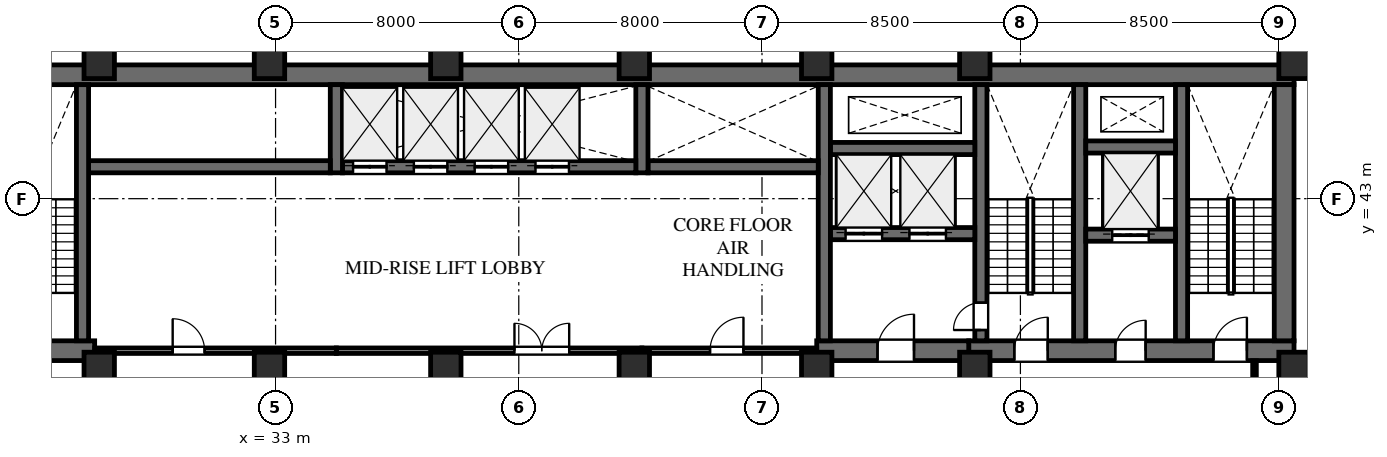
"""IFC4 building model, lengths in metres.
Left out: names, types, materials, properties, quantities, classifications, styles, units other than length and angle.
Written with IfcOpenShell. Run it as: python <this file> out.ifc"""

import sys

from ifc_helpers import new_model, si_unit, direction, frame, frame_2d, origin, origin_2d, place, context, subcontext, project, spatial, rectangle, extrude, element, fill, save


model = new_model("IFC4")
c1 = context("Model", 3, precision=1e-05, world=origin(), true_north=direction((0.0, 1.0)))
c2 = subcontext(c1, "Body", "Model", "MODEL_VIEW")
j1 = project(units=[si_unit("LENGTHUNIT", "METRE"), si_unit("PLANEANGLEUNIT", "RADIAN")], contexts=[c1])
p1 = place(None, origin())
s1 = spatial("IfcSite", under=j1, at=p1, CompositionType="ELEMENT")
p2 = place(p1, origin())
s2 = spatial("IfcBuilding", under=s1, at=p2, CompositionType="ELEMENT")
p3 = place(p2, frame((0.0, 0.0, 96.0)))
s3 = spatial("IfcBuildingStorey", under=s2, at=p3, CompositionType="ELEMENT", Elevation=96.0)
p4 = place(p3, frame((22.9, 47.075, 0.0), z_axis=(0.0, 0.0, 1.0), x_axis=(1.0, 0.0, 0.0)))
e1 = element("IfcWall", 1, at=p4, inside=s3, PredefinedType="SHEAR", context=c2, shape_type="SweptSolid", body=[
    extrude(rectangle(XDim=43.6, YDim=0.65, at=frame_2d((21.8, 0.0))), origin(), (0.0, 0.0, 1.0), 4.0),
])
p5 = place(p3, frame((55.8, 38.0, 0.0), z_axis=(0.0, 0.0, 1.0), x_axis=(1.0, 0.0, 0.0)))
e2 = element("IfcWall", 2, at=p5, inside=s3, PredefinedType="SHEAR", context=c2, shape_type="SweptSolid", body=[
    extrude(rectangle(XDim=10.7, YDim=0.65, at=frame_2d((5.35, 0.0))), origin(), (0.0, 0.0, 1.0), 4.0),
])
p6 = place(p5, frame((1.5, 0.0, 0.0)))
e3 = element("IfcOpeningElement", 3, at=p6, cuts=e2, PredefinedType="OPENING", context=c2, shape_type="SweptSolid", body=[
    extrude(rectangle(XDim=1.1, YDim=2.2, at=frame_2d((0.55, 1.1))), frame((0.0, 0.335, 0.0), z_axis=(0.0, -1.0, 0.0), x_axis=(1.0, 0.0, 0.0)), (0.0, 0.0, 1.0), 0.67),
])
p7 = place(p5, frame((4.82, 0.0, 0.0)))
e4 = element("IfcOpeningElement", 4, at=p7, cuts=e2, PredefinedType="OPENING", context=c2, shape_type="SweptSolid", body=[
    extrude(rectangle(XDim=1.0, YDim=2.15, at=frame_2d((0.5, 1.075))), frame((0.0, 0.335, 0.0), z_axis=(0.0, -1.0, 0.0), x_axis=(1.0, 0.0, 0.0)), (0.0, 0.0, 1.0), 0.67),
])
p8 = place(p5, frame((8.05, 0.0, 0.0)))
e5 = element("IfcOpeningElement", 5, at=p8, cuts=e2, PredefinedType="OPENING", context=c2, shape_type="SweptSolid", body=[
    extrude(rectangle(XDim=1.1, YDim=2.2, at=frame_2d((0.55, 1.1))), frame((0.0, 0.335, 0.0), z_axis=(0.0, -1.0, 0.0), x_axis=(1.0, 0.0, 0.0)), (0.0, 0.0, 1.0), 0.67),
])
p9 = place(p3, frame((66.175, 38.325, 0.0), z_axis=(0.0, 0.0, 1.0), x_axis=(0.0, 1.0, 0.0)))
e6 = element("IfcWall", 6, at=p9, inside=s3, PredefinedType="SHEAR", context=c2, shape_type="SweptSolid", body=[
    extrude(rectangle(XDim=8.425, YDim=0.65, at=frame_2d((4.212, 0.0))), origin(), (0.0, 0.0, 1.0), 4.0),
])
for number, where, z_axis, x_axis in (
    (7, (62.8, 38.325, 0.0), (0.0, 0.0, 1.0), (0.0, 1.0, 0.0)),
    (8, (59.45, 38.325, 0.0), (0.0, 0.0, 1.0), (0.0, 1.0, 0.0)),
):
    element("IfcWall", number, at=place(p3, frame(where, z_axis=z_axis, x_axis=x_axis)), inside=s3, PredefinedType="SHEAR", context=c2, shape_type="SweptSolid", body=[
        extrude(rectangle(XDim=8.425, YDim=0.4, at=frame_2d((4.212, 0.0))), origin(), (0.0, 0.0, 1.0), 4.0),
    ])
p10 = place(p3, frame((56.2, 38.325, 0.0), z_axis=(0.0, 0.0, 1.0), x_axis=(0.0, 1.0, 0.0)))
e9 = element("IfcWall", 9, at=p10, inside=s3, PredefinedType="SHEAR", context=c2, shape_type="SweptSolid", body=[
    extrude(rectangle(XDim=8.425, YDim=0.4, at=frame_2d((4.212, 0.0))), origin(), (0.0, 0.0, 1.0), 4.0),
])
p11 = place(p10, frame((0.355, 0.0, 0.0)))
e10 = element("IfcOpeningElement", 10, at=p11, cuts=e9, PredefinedType="OPENING", context=c2, shape_type="SweptSolid", body=[
    extrude(rectangle(XDim=0.9, YDim=2.15, at=frame_2d((0.45, 1.075))), frame((0.0, 0.21, 0.0), z_axis=(0.0, -1.0, 0.0), x_axis=(1.0, 0.0, 0.0)), (0.0, 0.0, 1.0), 0.42),
])
p12 = place(p3, frame((59.65, 41.8, 0.0), z_axis=(0.0, 0.0, 1.0), x_axis=(1.0, 0.0, 0.0)))
e11 = element("IfcWall", 11, at=p12, inside=s3, PredefinedType="SHEAR", context=c2, shape_type="SweptSolid", body=[
    extrude(rectangle(XDim=2.95, YDim=0.4, at=frame_2d((1.475, 0.0))), origin(), (0.0, 0.0, 1.0), 4.0),
])
p13 = place(p12, frame((0.87, 0.0, 0.0)))
e12 = element("IfcOpeningElement", 12, at=p13, cuts=e11, PredefinedType="OPENING", context=c2, shape_type="SweptSolid", body=[
    extrude(rectangle(XDim=1.2, YDim=2.2, at=frame_2d((0.6, 1.1))), frame((0.0, 0.21, 0.0), z_axis=(0.0, -1.0, 0.0), x_axis=(1.0, 0.0, 0.0)), (0.0, 0.0, 1.0), 0.42),
])
p14 = place(p3, frame((59.65, 44.7, 0.0), z_axis=(0.0, 0.0, 1.0), x_axis=(1.0, 0.0, 0.0)))
e13 = element("IfcWall", 13, at=p14, inside=s3, PredefinedType="SHEAR", context=c2, shape_type="SweptSolid", body=[
    extrude(rectangle(XDim=2.95, YDim=0.4, at=frame_2d((1.475, 0.0))), origin(), (0.0, 0.0, 1.0), 4.0),
])
p15 = place(p3, frame((50.8, 38.0, 0.0), z_axis=(0.0, 0.0, 1.0), x_axis=(1.0, 0.0, 0.0)))
e14 = element("IfcWall", 14, at=p15, inside=s3, PredefinedType="SHEAR", context=c2, shape_type="SweptSolid", body=[
    extrude(rectangle(XDim=5.0, YDim=0.65, at=frame_2d((2.5, 0.0))), origin(), (0.0, 0.0, 1.0), 4.0),
])
p16 = place(p15, frame((2.0, 0.0, 0.0)))
e15 = element("IfcOpeningElement", 15, at=p16, cuts=e14, PredefinedType="OPENING", context=c2, shape_type="SweptSolid", body=[
    extrude(rectangle(XDim=1.2, YDim=2.2, at=frame_2d((0.6, 1.1))), frame((0.0, 0.335, 0.0), z_axis=(0.0, -1.0, 0.0), x_axis=(1.0, 0.0, 0.0)), (0.0, 0.0, 1.0), 0.67),
])
p17 = place(p3, frame((51.25, 41.85, 0.0), z_axis=(0.0, 0.0, 1.0), x_axis=(1.0, 0.0, 0.0)))
e16 = element("IfcWall", 16, at=p17, inside=s3, PredefinedType="SHEAR", context=c2, shape_type="SweptSolid", body=[
    extrude(rectangle(XDim=4.75, YDim=0.4, at=frame_2d((2.375, 0.0))), origin(), (0.0, 0.0, 1.0), 4.0),
])
p18 = place(p17, frame((0.5, 0.0, 0.0)))
e17 = element("IfcOpeningElement", 17, at=p18, cuts=e16, PredefinedType="OPENING", context=c2, shape_type="SweptSolid", body=[
    extrude(rectangle(XDim=1.2, YDim=2.2, at=frame_2d((0.6, 1.1))), frame((0.0, 0.21, 0.0), z_axis=(0.0, -1.0, 0.0), x_axis=(1.0, 0.0, 0.0)), (0.0, 0.0, 1.0), 0.42),
])
p19 = place(p17, frame((2.6, 0.0, 0.0)))
e18 = element("IfcOpeningElement", 18, at=p19, cuts=e16, PredefinedType="OPENING", context=c2, shape_type="SweptSolid", body=[
    extrude(rectangle(XDim=1.2, YDim=2.2, at=frame_2d((0.6, 1.1))), frame((0.0, 0.21, 0.0), z_axis=(0.0, -1.0, 0.0), x_axis=(1.0, 0.0, 0.0)), (0.0, 0.0, 1.0), 0.42),
])
p20 = place(p3, frame((51.25, 44.65, 0.0), z_axis=(0.0, 0.0, 1.0), x_axis=(1.0, 0.0, 0.0)))
e19 = element("IfcWall", 19, at=p20, inside=s3, PredefinedType="SHEAR", context=c2, shape_type="SweptSolid", body=[
    extrude(rectangle(XDim=4.75, YDim=0.4, at=frame_2d((2.375, 0.0))), origin(), (0.0, 0.0, 1.0), 4.0),
])
p21 = place(p3, frame((51.05, 38.325, 0.0), z_axis=(0.0, 0.0, 1.0), x_axis=(0.0, 1.0, 0.0)))
e20 = element("IfcWall", 20, at=p21, inside=s3, PredefinedType="SHEAR", context=c2, shape_type="SweptSolid", body=[
    extrude(rectangle(XDim=8.425, YDim=0.4, at=frame_2d((4.212, 0.0))), origin(), (0.0, 0.0, 1.0), 4.0),
])
p22 = place(p3, frame((45.25, 44.05, 0.0), z_axis=(0.0, 0.0, 1.0), x_axis=(1.0, 0.0, 0.0)))
e21 = element("IfcWall", 21, at=p22, inside=s3, PredefinedType="SHEAR", context=c2, shape_type="SweptSolid", body=[
    extrude(rectangle(XDim=5.6, YDim=0.4, at=frame_2d((2.8, 0.0))), origin(), (0.0, 0.0, 1.0), 4.0),
])
p23 = place(p3, frame((45.05, 43.85, 0.0), z_axis=(0.0, 0.0, 1.0), x_axis=(0.0, 1.0, 0.0)))
e22 = element("IfcWall", 22, at=p23, inside=s3, PredefinedType="SHEAR", context=c2, shape_type="SweptSolid", body=[
    extrude(rectangle(XDim=2.9, YDim=0.4, at=frame_2d((1.45, 0.0))), origin(), (0.0, 0.0, 1.0), 4.0),
])
p24 = place(p3, frame((35.2, 44.05, 0.0), z_axis=(0.0, 0.0, 1.0), x_axis=(1.0, 0.0, 0.0)))
e23 = element("IfcWall", 23, at=p24, inside=s3, PredefinedType="SHEAR", context=c2, shape_type="SweptSolid", body=[
    extrude(rectangle(XDim=9.65, YDim=0.4, at=frame_2d((4.825, 0.0))), origin(), (0.0, 0.0, 1.0), 4.0),
])
p25 = place(p24, frame((0.35, 0.0, 0.0)))
e24 = element("IfcOpeningElement", 24, at=p25, cuts=e23, PredefinedType="OPENING", context=c2, shape_type="SweptSolid", body=[
    extrude(rectangle(XDim=1.1, YDim=2.2, at=frame_2d((0.55, 1.1))), frame((0.0, 0.21, 0.0), z_axis=(0.0, -1.0, 0.0), x_axis=(1.0, 0.0, 0.0)), (0.0, 0.0, 1.0), 0.42),
])
p26 = place(p24, frame((2.35, 0.0, 0.0)))
e25 = element("IfcOpeningElement", 25, at=p26, cuts=e23, PredefinedType="OPENING", context=c2, shape_type="SweptSolid", body=[
    extrude(rectangle(XDim=1.1, YDim=2.2, at=frame_2d((0.55, 1.1))), frame((0.0, 0.21, 0.0), z_axis=(0.0, -1.0, 0.0), x_axis=(1.0, 0.0, 0.0)), (0.0, 0.0, 1.0), 0.42),
])
p27 = place(p24, frame((4.35, 0.0, 0.0)))
e26 = element("IfcOpeningElement", 26, at=p27, cuts=e23, PredefinedType="OPENING", context=c2, shape_type="SweptSolid", body=[
    extrude(rectangle(XDim=1.1, YDim=2.2, at=frame_2d((0.55, 1.1))), frame((0.0, 0.21, 0.0), z_axis=(0.0, -1.0, 0.0), x_axis=(1.0, 0.0, 0.0)), (0.0, 0.0, 1.0), 0.42),
])
p28 = place(p24, frame((6.35, 0.0, 0.0)))
e27 = element("IfcOpeningElement", 27, at=p28, cuts=e23, PredefinedType="OPENING", context=c2, shape_type="SweptSolid", body=[
    extrude(rectangle(XDim=1.1, YDim=2.2, at=frame_2d((0.55, 1.1))), frame((0.0, 0.21, 0.0), z_axis=(0.0, -1.0, 0.0), x_axis=(1.0, 0.0, 0.0)), (0.0, 0.0, 1.0), 0.42),
])
p29 = place(p3, frame((35.0, 43.85, 0.0), z_axis=(0.0, 0.0, 1.0), x_axis=(0.0, 1.0, 0.0)))
e28 = element("IfcWall", 28, at=p29, inside=s3, PredefinedType="SHEAR", context=c2, shape_type="SweptSolid", body=[
    extrude(rectangle(XDim=2.9, YDim=0.4, at=frame_2d((1.45, 0.0))), origin(), (0.0, 0.0, 1.0), 4.0),
])
p30 = place(p3, frame((26.85, 44.05, 0.0), z_axis=(0.0, 0.0, 1.0), x_axis=(1.0, 0.0, 0.0)))
e29 = element("IfcWall", 29, at=p30, inside=s3, PredefinedType="SHEAR", context=c2, shape_type="SweptSolid", body=[
    extrude(rectangle(XDim=7.95, YDim=0.4, at=frame_2d((3.975, 0.0))), origin(), (0.0, 0.0, 1.0), 4.0),
])
p31 = place(p3, frame((22.95, 38.0, 0.0), z_axis=(0.0, 0.0, 1.0), x_axis=(1.0, 0.0, 0.0)))
e30 = element("IfcWall", 30, at=p31, inside=s3, PredefinedType="SHEAR", context=c2, shape_type="SweptSolid", body=[
    extrude(rectangle(XDim=4.1, YDim=0.65, at=frame_2d((2.05, 0.0))), origin(), (0.0, 0.0, 1.0), 4.0),
])
p32 = place(p31, frame((1.5, 0.0, 0.0)))
e31 = element("IfcOpeningElement", 31, at=p32, cuts=e30, PredefinedType="OPENING", context=c2, shape_type="SweptSolid", body=[
    extrude(rectangle(XDim=1.1, YDim=2.2, at=frame_2d((0.55, 1.1))), frame((0.0, 0.335, 0.0), z_axis=(0.0, -1.0, 0.0), x_axis=(1.0, 0.0, 0.0)), (0.0, 0.0, 1.0), 0.67),
])
p33 = place(p3, frame((26.65, 38.325, 0.0), z_axis=(0.0, 0.0, 1.0), x_axis=(0.0, 1.0, 0.0)))
e32 = element("IfcWall", 32, at=p33, inside=s3, PredefinedType="SHEAR", context=c2, shape_type="SweptSolid", body=[
    extrude(rectangle(XDim=8.425, YDim=0.4, at=frame_2d((4.212, 0.0))), origin(), (0.0, 0.0, 1.0), 4.0),
])
for number, where, z_axis, x_axis in (
    (33, (66.5, 47.55, 0.0), (0.0, 0.0, 1.0), (1.0, 0.0, 0.0)),
    (34, (56.0, 47.55, 0.0), (0.0, 0.0, 1.0), (1.0, 0.0, 0.0)),
    (35, (66.5, 37.35, 0.0), (0.0, 0.0, 1.0), (1.0, 0.0, 0.0)),
    (36, (56.0, 37.35, 0.0), (0.0, 0.0, 1.0), (1.0, 0.0, 0.0)),
    (37, (50.8, 47.55, 0.0), (0.0, 0.0, 1.0), (1.0, 0.0, 0.0)),
    (38, (50.8, 37.35, 0.0), (0.0, 0.0, 1.0), (1.0, 0.0, 0.0)),
    (39, (44.8, 37.35, 0.0), (0.0, 0.0, 1.0), (1.0, 0.0, 0.0)),
    (40, (44.8, 47.55, 0.0), (0.0, 0.0, 1.0), (1.0, 0.0, 0.0)),
    (41, (38.6, 37.35, 0.0), (0.0, 0.0, 1.0), (1.0, 0.0, 0.0)),
    (42, (38.6, 47.55, 0.0), (0.0, 0.0, 1.0), (1.0, 0.0, 0.0)),
    (43, (32.8, 37.35, 0.0), (0.0, 0.0, 1.0), (1.0, 0.0, 0.0)),
    (44, (32.8, 47.55, 0.0), (0.0, 0.0, 1.0), (1.0, 0.0, 0.0)),
    (45, (27.2, 37.35, 0.0), (0.0, 0.0, 1.0), (1.0, 0.0, 0.0)),
    (46, (27.2, 47.55, 0.0), (0.0, 0.0, 1.0), (1.0, 0.0, 0.0)),
):
    element("IfcColumn", number, at=place(p3, frame(where, z_axis=z_axis, x_axis=x_axis)), inside=s3, PredefinedType="COLUMN", context=c2, shape_type="SweptSolid", body=[
        extrude(rectangle(XDim=1.0, YDim=1.2, at=origin_2d()), origin(), (0.0, 0.0, 1.0), 4.0),
    ])
p34 = place(p3, frame((45.05, 38.0, 0.0), z_axis=(0.0, 0.0, 1.0), x_axis=(1.0, 0.0, 0.0)))
e47 = element("IfcWall", 47, at=p34, inside=s3, PredefinedType="STANDARD", context=c2, shape_type="SweptSolid", body=[
    extrude(rectangle(XDim=5.75, YDim=0.18, at=frame_2d((2.875, 0.0))), origin(), (0.0, 0.0, 1.0), 2.894),
])
p35 = place(p34, frame((2.24, 0.0, 0.0)))
e48 = element("IfcOpeningElement", 48, at=p35, cuts=e47, PredefinedType="OPENING", context=c2, shape_type="SweptSolid", body=[
    extrude(rectangle(XDim=1.1, YDim=2.2, at=frame_2d((0.55, 1.1))), frame((0.0, 0.1, 0.0), z_axis=(0.0, -1.0, 0.0), x_axis=(1.0, 0.0, 0.0)), (0.0, 0.0, 1.0), 0.2),
])
p36 = place(p3, frame((27.05, 38.0, 0.0), z_axis=(0.0, 0.0, 1.0), x_axis=(1.0, 0.0, 0.0)))
e49 = element("IfcWall", 49, at=p36, inside=s3, PredefinedType="STANDARD", context=c2, shape_type="SweptSolid", body=[
    extrude(rectangle(XDim=7.95, YDim=0.18, at=frame_2d((3.975, 0.0))), origin(), (0.0, 0.0, 1.0), 2.894),
])
p37 = place(p36, frame((2.566, 0.0, 0.0)))
e50 = element("IfcOpeningElement", 50, at=p37, cuts=e49, PredefinedType="OPENING", context=c2, shape_type="SweptSolid", body=[
    extrude(rectangle(XDim=1.05, YDim=2.2, at=frame_2d((0.525, 1.1))), frame((0.0, 0.1, 0.0), z_axis=(0.0, -1.0, 0.0), x_axis=(1.0, 0.0, 0.0)), (0.0, 0.0, 1.0), 0.2),
])
p38 = place(p3, frame((35.0, 38.0, 0.0), z_axis=(0.0, 0.0, 1.0), x_axis=(1.0, 0.0, 0.0)))
e51 = element("IfcWall", 51, at=p38, inside=s3, PredefinedType="STANDARD", context=c2, shape_type="SweptSolid", body=[
    extrude(rectangle(XDim=10.05, YDim=0.18, at=frame_2d((5.025, 0.0))), origin(), (0.0, 0.0, 1.0), 2.894),
])
p39 = place(p38, frame((5.858, 0.0, 0.0)))
e52 = element("IfcOpeningElement", 52, at=p39, cuts=e51, PredefinedType="OPENING", context=c2, shape_type="SweptSolid", body=[
    extrude(rectangle(XDim=1.8, YDim=2.2, at=frame_2d((0.9, 1.1))), frame((0.0, 0.1, 0.0), z_axis=(0.0, -1.0, 0.0), x_axis=(1.0, 0.0, 0.0)), (0.0, 0.0, 1.0), 0.2),
])
p40 = place(p3, frame((65.2, 34.4, 0.0), z_axis=(0.0, 0.0, 1.0), x_axis=(0.0, 1.0, 0.0)))
e53 = element("IfcWall", 53, at=p40, inside=s3, PredefinedType="PARTITIONING", context=c2, shape_type="SweptSolid", body=[
    extrude(rectangle(XDim=3.267, YDim=0.12, at=frame_2d((1.634, 0.0))), origin(), (0.0, 0.0, 1.0), 2.894),
])
p41 = place(p6, origin())
e54 = element("IfcDoor", 54, at=p41, inside=s3, OperationType="SINGLE_SWING_RIGHT", PredefinedType="DOOR", context=c2, shape_type="SweptSolid", body=[
    extrude(rectangle(XDim=1.1, YDim=2.2, at=frame_2d((0.55, 1.1))), frame((0.0, 0.025, 0.0), z_axis=(0.0, -1.0, 0.0), x_axis=(1.0, 0.0, 0.0)), (0.0, 0.0, 1.0), 0.05),
])
fill(e3, e54)
p42 = place(p7, origin())
e55 = element("IfcDoor", 55, at=p42, inside=s3, OperationType="SINGLE_SWING_RIGHT", PredefinedType="DOOR", context=c2, shape_type="SweptSolid", body=[
    extrude(rectangle(XDim=1.0, YDim=2.15, at=frame_2d((0.5, 1.075))), frame((0.0, 0.025, 0.0), z_axis=(0.0, -1.0, 0.0), x_axis=(1.0, 0.0, 0.0)), (0.0, 0.0, 1.0), 0.05),
])
fill(e4, e55)
p43 = place(p8, origin())
e56 = element("IfcDoor", 56, at=p43, inside=s3, OperationType="SINGLE_SWING_RIGHT", PredefinedType="DOOR", context=c2, shape_type="SweptSolid", body=[
    extrude(rectangle(XDim=1.1, YDim=2.2, at=frame_2d((0.55, 1.1))), frame((0.0, 0.025, 0.0), z_axis=(0.0, -1.0, 0.0), x_axis=(1.0, 0.0, 0.0)), (0.0, 0.0, 1.0), 0.05),
])
fill(e5, e56)
p44 = place(p16, origin())
e57 = element("IfcDoor", 57, at=p44, inside=s3, OperationType="SINGLE_SWING_RIGHT", PredefinedType="DOOR", context=c2, shape_type="SweptSolid", body=[
    extrude(rectangle(XDim=1.2, YDim=2.2, at=frame_2d((0.6, 1.1))), frame((0.0, 0.025, 0.0), z_axis=(0.0, -1.0, 0.0), x_axis=(1.0, 0.0, 0.0)), (0.0, 0.0, 1.0), 0.05),
])
fill(e15, e57)
p45 = place(p11, origin())
e58 = element("IfcDoor", 58, at=p45, inside=s3, OperationType="SINGLE_SWING_LEFT", PredefinedType="DOOR", context=c2, shape_type="SweptSolid", body=[
    extrude(rectangle(XDim=0.9, YDim=2.15, at=frame_2d((0.45, 1.075))), frame((0.0, 0.025, 0.0), z_axis=(0.0, -1.0, 0.0), x_axis=(1.0, 0.0, 0.0)), (0.0, 0.0, 1.0), 0.05),
])
fill(e10, e58)
p46 = place(p25, origin())
e59 = element("IfcDoor", 59, at=p46, inside=s3, OperationType="DOUBLE_DOOR_SLIDING", PredefinedType="DOOR", context=c2, shape_type="SweptSolid", body=[
    extrude(rectangle(XDim=1.1, YDim=2.2, at=frame_2d((0.55, 1.1))), frame((0.0, 0.025, 0.0), z_axis=(0.0, -1.0, 0.0), x_axis=(1.0, 0.0, 0.0)), (0.0, 0.0, 1.0), 0.05),
])
fill(e24, e59)
p47 = place(p26, origin())
e60 = element("IfcDoor", 60, at=p47, inside=s3, OperationType="DOUBLE_DOOR_SLIDING", PredefinedType="DOOR", context=c2, shape_type="SweptSolid", body=[
    extrude(rectangle(XDim=1.1, YDim=2.2, at=frame_2d((0.55, 1.1))), frame((0.0, 0.025, 0.0), z_axis=(0.0, -1.0, 0.0), x_axis=(1.0, 0.0, 0.0)), (0.0, 0.0, 1.0), 0.05),
])
fill(e25, e60)
p48 = place(p27, origin())
e61 = element("IfcDoor", 61, at=p48, inside=s3, OperationType="DOUBLE_DOOR_SLIDING", PredefinedType="DOOR", context=c2, shape_type="SweptSolid", body=[
    extrude(rectangle(XDim=1.1, YDim=2.2, at=frame_2d((0.55, 1.1))), frame((0.0, 0.025, 0.0), z_axis=(0.0, -1.0, 0.0), x_axis=(1.0, 0.0, 0.0)), (0.0, 0.0, 1.0), 0.05),
])
fill(e26, e61)
p49 = place(p28, origin())
e62 = element("IfcDoor", 62, at=p49, inside=s3, OperationType="DOUBLE_DOOR_SLIDING", PredefinedType="DOOR", context=c2, shape_type="SweptSolid", body=[
    extrude(rectangle(XDim=1.1, YDim=2.2, at=frame_2d((0.55, 1.1))), frame((0.0, 0.025, 0.0), z_axis=(0.0, -1.0, 0.0), x_axis=(1.0, 0.0, 0.0)), (0.0, 0.0, 1.0), 0.05),
])
fill(e27, e62)
p50 = place(p18, origin())
e63 = element("IfcDoor", 63, at=p50, inside=s3, OperationType="DOUBLE_DOOR_SLIDING", PredefinedType="DOOR", context=c2, shape_type="SweptSolid", body=[
    extrude(rectangle(XDim=1.2, YDim=2.2, at=frame_2d((0.6, 1.1))), frame((0.0, 0.025, 0.0), z_axis=(0.0, -1.0, 0.0), x_axis=(1.0, 0.0, 0.0)), (0.0, 0.0, 1.0), 0.05),
])
fill(e17, e63)
p51 = place(p19, origin())
e64 = element("IfcDoor", 64, at=p51, inside=s3, OperationType="DOUBLE_DOOR_SLIDING", PredefinedType="DOOR", context=c2, shape_type="SweptSolid", body=[
    extrude(rectangle(XDim=1.2, YDim=2.2, at=frame_2d((0.6, 1.1))), frame((0.0, 0.025, 0.0), z_axis=(0.0, -1.0, 0.0), x_axis=(1.0, 0.0, 0.0)), (0.0, 0.0, 1.0), 0.05),
])
fill(e18, e64)
p52 = place(p13, origin())
e65 = element("IfcDoor", 65, at=p52, inside=s3, OperationType="DOUBLE_DOOR_SLIDING", PredefinedType="DOOR", context=c2, shape_type="SweptSolid", body=[
    extrude(rectangle(XDim=1.2, YDim=2.2, at=frame_2d((0.6, 1.1))), frame((0.0, 0.025, 0.0), z_axis=(0.0, -1.0, 0.0), x_axis=(1.0, 0.0, 0.0)), (0.0, 0.0, 1.0), 0.05),
])
fill(e12, e65)
p53 = place(p35, origin())
e66 = element("IfcDoor", 66, at=p53, inside=s3, OperationType="SINGLE_SWING_RIGHT", PredefinedType="DOOR", context=c2, shape_type="SweptSolid", body=[
    extrude(rectangle(XDim=1.1, YDim=2.2, at=frame_2d((0.55, 1.1))), frame((0.0, 0.025, 0.0), z_axis=(0.0, -1.0, 0.0), x_axis=(1.0, 0.0, 0.0)), (0.0, 0.0, 1.0), 0.05),
])
fill(e48, e66)
p54 = place(p37, origin())
e67 = element("IfcDoor", 67, at=p54, inside=s3, OperationType="SINGLE_SWING_LEFT", PredefinedType="DOOR", context=c2, shape_type="SweptSolid", body=[
    extrude(rectangle(XDim=1.05, YDim=2.2, at=frame_2d((0.525, 1.1))), frame((0.0, 0.025, 0.0), z_axis=(0.0, -1.0, 0.0), x_axis=(1.0, 0.0, 0.0)), (0.0, 0.0, 1.0), 0.05),
])
fill(e50, e67)
p55 = place(p39, origin())
e68 = element("IfcDoor", 68, at=p55, inside=s3, OperationType="DOUBLE_DOOR_SINGLE_SWING", PredefinedType="DOOR", context=c2, shape_type="SweptSolid", body=[
    extrude(rectangle(XDim=1.8, YDim=2.2, at=frame_2d((0.9, 1.1))), frame((0.0, 0.025, 0.0), z_axis=(0.0, -1.0, 0.0), x_axis=(1.0, 0.0, 0.0)), (0.0, 0.0, 1.0), 0.05),
])
fill(e52, e68)
save(model, sys.argv[1])
